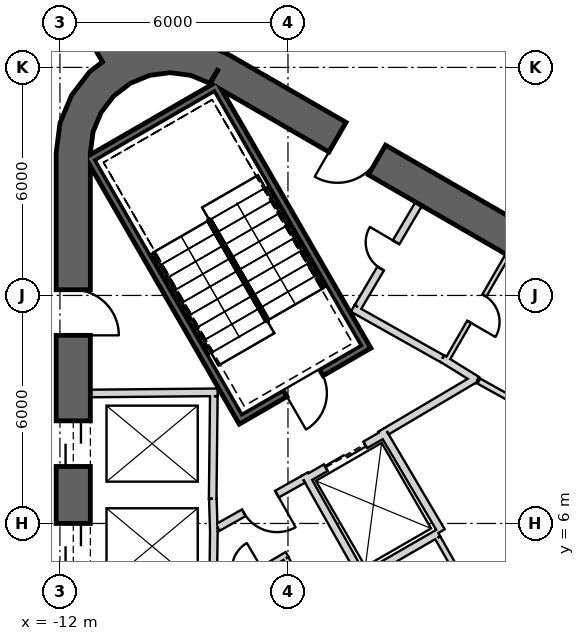
"""IFC4 building model, lengths in metres.
Left out: names, types, materials, properties, quantities, classifications, styles, units other than length and angle.
Written with IfcOpenShell. Run it as: python <this file> out.ifc"""

import sys

from ifc_helpers import new_model, si_unit, direction, frame, frame_2d, origin, place, context, subcontext, project, spatial, polyline, rectangle, outline, extrude, element, fill, save


model = new_model("IFC4")
c1 = context("Model", 3, precision=1e-05, world=origin(), true_north=direction((0.0, 1.0)))
c2 = subcontext(c1, "Body", "Model", "MODEL_VIEW")
j1 = project(units=[si_unit("LENGTHUNIT", "METRE"), si_unit("PLANEANGLEUNIT", "RADIAN")], contexts=[c1])
p1 = place(None, origin())
s1 = spatial("IfcSite", under=j1, at=p1, CompositionType="ELEMENT")
p2 = place(p1, origin())
s2 = spatial("IfcBuilding", under=s1, at=p2, CompositionType="ELEMENT")
p3 = place(p2, frame((0.0, 0.0, 277.2)))
s3 = spatial("IfcBuildingStorey", under=s2, at=p3, CompositionType="ELEMENT", Elevation=277.2)
p4 = place(p3, frame((19.475, 2.208, 0.0), z_axis=(0.0, 0.0, 1.0), x_axis=(-0.866028369851, 0.499994862586, 0.0)))
e1 = element("IfcWall", 1, at=p4, inside=s3, PredefinedType="SHEAR", context=c2, shape_type="SweptSolid", body=[
    extrude(rectangle(XDim=31.523, YDim=0.9, at=frame_2d((15.762, 0.0))), origin(), (0.0, 0.0, 1.0), 6.5),
])
p5 = place(p4, frame((7.062, 0.0, 0.0)))
e2 = element("IfcOpeningElement", 2, at=p5, cuts=e1, PredefinedType="OPENING", context=c2, shape_type="SweptSolid", body=[
    extrude(rectangle(XDim=1.2, YDim=2.4, at=frame_2d((0.6, 1.2))), frame((0.0, 0.46, 0.0), z_axis=(0.0, -1.0, 0.0), x_axis=(1.0, 0.0, 0.0)), (0.0, 0.0, 1.0), 0.92),
])
p6 = place(p4, frame((3.612, 0.0, 0.0)))
e3 = element("IfcOpeningElement", 3, at=p6, cuts=e1, PredefinedType="OPENING", context=c2, shape_type="SweptSolid", body=[
    extrude(rectangle(XDim=1.2, YDim=2.4, at=frame_2d((0.6, 1.2))), frame((0.0, 0.46, 0.0), z_axis=(0.0, -1.0, 0.0), x_axis=(1.0, 0.0, 0.0)), (0.0, 0.0, 1.0), 0.92),
])
p7 = place(p4, frame((26.712, 0.0, 0.0)))
e4 = element("IfcOpeningElement", 4, at=p7, cuts=e1, PredefinedType="OPENING", context=c2, shape_type="SweptSolid", body=[
    extrude(rectangle(XDim=1.2, YDim=2.4, at=frame_2d((0.6, 1.2))), frame((0.0, 0.46, 0.0), z_axis=(0.0, -1.0, 0.0), x_axis=(1.0, 0.0, 0.0)), (0.0, 0.0, 1.0), 0.92),
])
p8 = place(p3, frame((-11.65, 15.762, 0.0), z_axis=(0.0, 0.0, 1.0), x_axis=(0.0, -1.0, 0.0)))
e5 = element("IfcWall", 5, at=p8, inside=s3, PredefinedType="SHEAR", context=c2, shape_type="SweptSolid", body=[
    extrude(rectangle(XDim=31.523, YDim=0.9, at=frame_2d((15.762, 0.0))), origin(), (0.0, 0.0, 1.0), 6.5),
])
p9 = place(p8, frame((7.062, 0.0, 0.0)))
e6 = element("IfcOpeningElement", 6, at=p9, cuts=e5, PredefinedType="OPENING", context=c2, shape_type="SweptSolid", body=[
    extrude(rectangle(XDim=1.2, YDim=2.4, at=frame_2d((0.6, 1.2))), frame((0.0, 0.46, 0.0), z_axis=(0.0, -1.0, 0.0), x_axis=(1.0, 0.0, 0.0)), (0.0, 0.0, 1.0), 0.92),
])
p10 = place(p8, frame((9.762, 0.0, 0.0)))
e7 = element("IfcOpeningElement", 7, at=p10, cuts=e5, PredefinedType="OPENING", context=c2, shape_type="SweptSolid", body=[
    extrude(rectangle(XDim=1.2, YDim=2.4, at=frame_2d((0.6, 1.2))), frame((0.0, 0.46, 0.0), z_axis=(0.0, -1.0, 0.0), x_axis=(1.0, 0.0, 0.0)), (0.0, 0.0, 1.0), 0.92),
])
p11 = place(p8, frame((12.462, 0.0, 0.0)))
e8 = element("IfcOpeningElement", 8, at=p11, cuts=e5, PredefinedType="OPENING", context=c2, shape_type="SweptSolid", body=[
    extrude(rectangle(XDim=1.2, YDim=2.4, at=frame_2d((0.6, 1.2))), frame((0.0, 0.46, 0.0), z_axis=(0.0, -1.0, 0.0), x_axis=(1.0, 0.0, 0.0)), (0.0, 0.0, 1.0), 0.92),
])
p12 = place(p8, frame((15.162, 0.0, 0.0)))
e9 = element("IfcOpeningElement", 9, at=p12, cuts=e5, PredefinedType="OPENING", context=c2, shape_type="SweptSolid", body=[
    extrude(rectangle(XDim=1.2, YDim=2.4, at=frame_2d((0.6, 1.2))), frame((0.0, 0.46, 0.0), z_axis=(0.0, -1.0, 0.0), x_axis=(1.0, 0.0, 0.0)), (0.0, 0.0, 1.0), 0.92),
])
p13 = place(p8, frame((17.862, 0.0, 0.0)))
e10 = element("IfcOpeningElement", 10, at=p13, cuts=e5, PredefinedType="OPENING", context=c2, shape_type="SweptSolid", body=[
    extrude(rectangle(XDim=1.2, YDim=2.4, at=frame_2d((0.6, 1.2))), frame((0.0, 0.46, 0.0), z_axis=(0.0, -1.0, 0.0), x_axis=(1.0, 0.0, 0.0)), (0.0, 0.0, 1.0), 0.92),
])
p14 = place(p8, frame((20.562, 0.0, 0.0)))
e11 = element("IfcOpeningElement", 11, at=p14, cuts=e5, PredefinedType="OPENING", context=c2, shape_type="SweptSolid", body=[
    extrude(rectangle(XDim=1.2, YDim=2.4, at=frame_2d((0.6, 1.2))), frame((0.0, 0.46, 0.0), z_axis=(0.0, -1.0, 0.0), x_axis=(1.0, 0.0, 0.0)), (0.0, 0.0, 1.0), 0.92),
])
p15 = place(p8, frame((23.262, 0.0, 0.0)))
e12 = element("IfcOpeningElement", 12, at=p15, cuts=e5, PredefinedType="OPENING", context=c2, shape_type="SweptSolid", body=[
    extrude(rectangle(XDim=1.2, YDim=2.4, at=frame_2d((0.6, 1.2))), frame((0.0, 0.46, 0.0), z_axis=(0.0, -1.0, 0.0), x_axis=(1.0, 0.0, 0.0)), (0.0, 0.0, 1.0), 0.92),
])
p16 = place(p8, frame((3.612, 0.0, 0.0)))
e13 = element("IfcOpeningElement", 13, at=p16, cuts=e5, PredefinedType="OPENING", context=c2, shape_type="SweptSolid", body=[
    extrude(rectangle(XDim=1.2, YDim=2.4, at=frame_2d((0.6, 1.2))), frame((0.0, 0.46, 0.0), z_axis=(0.0, -1.0, 0.0), x_axis=(1.0, 0.0, 0.0)), (0.0, 0.0, 1.0), 0.92),
])
p17 = place(p8, frame((26.712, 0.0, 0.0)))
e14 = element("IfcOpeningElement", 14, at=p17, cuts=e5, PredefinedType="OPENING", context=c2, shape_type="SweptSolid", body=[
    extrude(rectangle(XDim=1.2, YDim=2.4, at=frame_2d((0.6, 1.2))), frame((0.0, 0.46, 0.0), z_axis=(0.0, -1.0, 0.0), x_axis=(1.0, 0.0, 0.0)), (0.0, 0.0, 1.0), 0.92),
])
p18 = place(p3, origin())
e15 = element("IfcWall", 15, at=p18, inside=s3, PredefinedType="SHEAR", context=c2, shape_type="SweptSolid", body=[
    extrude(outline(polyline([(-7.6, 18.36), (-8.323, 18.659), (-9.1, 18.762), (-9.876, 18.659), (-10.6, 18.36), (-11.221, 17.883), (-11.698, 17.262), (-11.998, 16.538), (-12.1, 15.762), (-11.2, 15.762), (-11.128, 16.305), (-10.919, 16.812), (-10.585, 17.247), (-10.15, 17.58), (-9.644, 17.79), (-9.1, 17.862), (-8.556, 17.79), (-8.05, 17.58), (-7.6, 18.36)])), origin(), (0.0, 0.0, 1.0), 6.5),
])
p19 = place(p3, frame((-10.575, 18.316, 0.0), z_axis=(0.0, 0.0, 1.0), x_axis=(-0.500007350791, 0.866021159762, 0.0)))
e16 = element("IfcWall", 16, at=p19, inside=s3, PredefinedType="SHEAR", context=c2, shape_type="SweptSolid", body=[
    extrude(rectangle(XDim=9.965, YDim=0.7, at=frame_2d((4.982, 0.0))), origin(), (0.0, 0.0, 1.0), 6.5),
])
p20 = place(p19, frame((2.05, 0.0, 0.0)))
e17 = element("IfcOpeningElement", 17, at=p20, cuts=e16, PredefinedType="OPENING", context=c2, shape_type="SweptSolid", body=[
    extrude(rectangle(XDim=1.4, YDim=2.4, at=frame_2d((0.7, 1.2))), frame((0.0, 0.36, 0.0), z_axis=(0.0, -1.0, 0.0), x_axis=(1.0, 0.0, 0.0)), (0.0, 0.0, 1.0), 0.72),
])
p21 = place(p3, frame((-11.2, 9.42, 0.0), z_axis=(0.0, 0.0, 1.0), x_axis=(0.999957167047, 0.009255488683, 0.0)))
e18 = element("IfcWall", 18, at=p21, inside=s3, PredefinedType="PLUMBINGWALL", context=c2, shape_type="SweptSolid", body=[
    extrude(rectangle(XDim=3.35, YDim=0.2, at=frame_2d((1.675, 0.0))), origin(), (0.0, 0.0, 1.0), 6.1),
])
p22 = place(p3, frame((-7.951, 9.35, 0.0), z_axis=(0.0, 0.0, 1.0), x_axis=(-0.011120469654, -0.999938165666, 0.0)))
e19 = element("IfcWall", 19, at=p22, inside=s3, PredefinedType="PLUMBINGWALL", context=c2, shape_type="SweptSolid", body=[
    extrude(rectangle(XDim=2.7, YDim=0.2, at=frame_2d((1.35, 0.0))), origin(), (0.0, 0.0, 1.0), 6.1),
])
p23 = place(p3, frame((-7.977, 6.65, 0.0), z_axis=(0.0, 0.0, 1.0), x_axis=(0.030861509705, -0.999523670164, 0.0)))
e20 = element("IfcWall", 20, at=p23, inside=s3, PredefinedType="PLUMBINGWALL", context=c2, shape_type="SweptSolid", body=[
    extrude(rectangle(XDim=0.878, YDim=0.2, at=frame_2d((0.439, 0.0))), origin(), (0.0, 0.0, 1.0), 6.1),
])
p24 = place(p3, frame((-7.949, 5.895, 0.0), z_axis=(0.0, 0.0, 1.0), x_axis=(-0.012042535896, -0.999927486035, 0.0)))
e21 = element("IfcWall", 21, at=p24, inside=s3, PredefinedType="PLUMBINGWALL", context=c2, shape_type="SweptSolid", body=[
    extrude(rectangle(XDim=1.845, YDim=0.2, at=frame_2d((0.922, 0.0))), origin(), (0.0, 0.0, 1.0), 6.1),
])
p25 = place(p3, frame((-11.245, 15.678, -0.35), z_axis=(0.0, 0.0, 1.0), x_axis=(0.499977274689, -0.866038523851, 0.0)))
e22 = element("IfcWall", 22, at=p25, inside=s3, PredefinedType="SHEAR", context=c2, shape_type="SweptSolid", body=[
    extrude(rectangle(XDim=8.1, YDim=0.2, at=frame_2d((4.05, 0.0))), origin(), (0.0, 0.0, 1.0), 6.45),
])
p26 = place(p3, frame((-7.818, 17.541, -0.35), z_axis=(0.0, 0.0, 1.0), x_axis=(-0.866044365799, -0.499967155389, 0.0)))
e23 = element("IfcWall", 23, at=p26, inside=s3, PredefinedType="SHEAR", context=c2, shape_type="SweptSolid", body=[
    extrude(rectangle(XDim=3.8, YDim=0.2, at=frame_2d((1.9, 0.0))), origin(), (0.0, 0.0, 1.0), 6.45),
])
p27 = place(p3, frame((-7.854, 17.405, -0.35), z_axis=(0.0, 0.0, 1.0), x_axis=(0.499997992926, -0.866026562566, 0.0)))
e24 = element("IfcWall", 24, at=p27, inside=s3, PredefinedType="SHEAR", context=c2, shape_type="SweptSolid", body=[
    extrude(rectangle(XDim=7.9, YDim=0.2, at=frame_2d((3.95, 0.0))), origin(), (0.0, 0.0, 1.0), 6.45),
])
p28 = place(p3, frame((-7.159, 8.8, -0.35), z_axis=(0.0, 0.0, 1.0), x_axis=(0.866047807691, 0.499961193289, 0.0)))
e25 = element("IfcWall", 25, at=p28, inside=s3, PredefinedType="SHEAR", context=c2, shape_type="SweptSolid", body=[
    extrude(rectangle(XDim=3.6, YDim=0.2, at=frame_2d((1.8, 0.0))), origin(), (0.0, 0.0, 1.0), 6.45),
])
p29 = place(p28, frame((1.25, 0.0, 0.35)))
e26 = element("IfcOpeningElement", 26, at=p29, cuts=e25, PredefinedType="OPENING", context=c2, shape_type="SweptSolid", body=[
    extrude(rectangle(XDim=1.1, YDim=2.1, at=frame_2d((0.55, 1.05))), frame((0.0, 0.11, 0.0), z_axis=(0.0, -1.0, 0.0), x_axis=(1.0, 0.0, 0.0)), (0.0, 0.0, 1.0), 0.22),
])
p30 = place(p3, frame((-5.524, 7.168, 0.0), z_axis=(0.0, 0.0, 1.0), x_axis=(0.866024647952, 0.500001309137, 0.0)))
e27 = element("IfcWall", 27, at=p30, inside=s3, PredefinedType="PLUMBINGWALL", context=c2, shape_type="SweptSolid", body=[
    extrude(rectangle(XDim=2.4, YDim=0.2, at=frame_2d((1.2, 0.0))), origin(), (0.0, 0.0, 1.0), 6.1),
])
p31 = place(p30, frame((0.6, 0.0, 0.0)))
e28 = element("IfcOpeningElement", 28, at=p31, cuts=e27, PredefinedType="OPENING", context=c2, shape_type="SweptSolid", body=[
    extrude(rectangle(XDim=1.2, YDim=2.4, at=frame_2d((0.6, 1.2))), frame((0.0, 0.11, 0.0), z_axis=(0.0, -1.0, 0.0), x_axis=(1.0, 0.0, 0.0)), (0.0, 0.0, 1.0), 0.22),
])
p32 = place(p3, frame((-3.538, 8.465, 0.0), z_axis=(0.0, 0.0, 1.0), x_axis=(0.508647062354, -0.860975125052, 0.0)))
e29 = element("IfcWall", 29, at=p32, inside=s3, PredefinedType="PLUMBINGWALL", context=c2, shape_type="SweptSolid", body=[
    extrude(rectangle(XDim=3.1, YDim=0.2, at=frame_2d((1.55, 0.0))), origin(), (0.0, 0.0, 1.0), 6.1),
])
p33 = place(p3, frame((-2.043, 5.748, 0.0), z_axis=(0.0, 0.0, 1.0), x_axis=(-0.866035096217, -0.499983211839, 0.0)))
e30 = element("IfcWall", 30, at=p33, inside=s3, PredefinedType="PLUMBINGWALL", context=c2, shape_type="SweptSolid", body=[
    extrude(rectangle(XDim=2.404, YDim=0.2, at=frame_2d((1.202, 0.0))), origin(), (0.0, 0.0, 1.0), 6.1),
])
p34 = place(p3, frame((-5.562, 7.296, 0.0), z_axis=(0.0, 0.0, 1.0), x_axis=(0.49134651263, -0.870964180966, 0.0)))
e31 = element("IfcWall", 31, at=p34, inside=s3, PredefinedType="PLUMBINGWALL", context=c2, shape_type="SweptSolid", body=[
    extrude(rectangle(XDim=3.0, YDim=0.2, at=frame_2d((1.5, 0.0))), origin(), (0.0, 0.0, 1.0), 6.1),
])
p35 = place(p3, frame((-0.22, 13.06, 0.0), z_axis=(0.0, 0.0, 1.0), x_axis=(-0.499984717929, -0.866034226713, 0.0)))
e32 = element("IfcWall", 32, at=p35, inside=s3, PredefinedType="PARTITIONING", context=c2, shape_type="SweptSolid", body=[
    extrude(rectangle(XDim=3.25, YDim=0.12, at=frame_2d((1.625, 0.0))), origin(), (0.0, 0.0, 1.0), 6.1),
])
p36 = place(p35, frame((1.225, 0.0, 0.0)))
e33 = element("IfcOpeningElement", 33, at=p36, cuts=e32, PredefinedType="OPENING", context=c2, shape_type="SweptSolid", body=[
    extrude(rectangle(XDim=0.8, YDim=2.1, at=frame_2d((0.4, 1.05))), frame((0.0, 0.07, 0.0), z_axis=(0.0, -1.0, 0.0), x_axis=(1.0, 0.0, 0.0)), (0.0, 0.0, 1.0), 0.14),
])
p37 = place(p3, frame((-1.941, 10.339, 0.0), z_axis=(0.0, 0.0, 1.0), x_axis=(0.850216889117, -0.526432561171, 0.0)))
e34 = element("IfcWall", 34, at=p37, inside=s3, PredefinedType="PARTITIONING", context=c2, shape_type="SweptSolid", body=[
    extrude(rectangle(XDim=1.078, YDim=0.2, at=frame_2d((0.539, 0.0))), origin(), (0.0, 0.0, 1.0), 6.1),
])
p38 = place(p3, frame((0.483, 8.936, 0.0), z_axis=(0.0, 0.0, 1.0), x_axis=(-0.874315691004, 0.485357674776, 0.0)))
e35 = element("IfcWall", 35, at=p38, inside=s3, PredefinedType="PLUMBINGWALL", context=c2, shape_type="SweptSolid", body=[
    extrude(rectangle(XDim=1.671, YDim=0.15, at=frame_2d((0.836, 0.0))), origin(), (0.0, 0.0, 1.0), 6.1),
])
p39 = place(p3, frame((-4.296, 11.659, 0.0), z_axis=(0.0, 0.0, 1.0), x_axis=(0.871534483978, -0.490334215854, 0.0)))
e36 = element("IfcWall", 36, at=p39, inside=s3, PredefinedType="PARTITIONING", context=c2, shape_type="SweptSolid", body=[
    extrude(rectangle(XDim=2.7, YDim=0.2, at=frame_2d((1.35, 0.0))), origin(), (0.0, 0.0, 1.0), 6.1),
])
p40 = place(p3, frame((-2.558, 14.409, 0.0), z_axis=(0.0, 0.0, 1.0), x_axis=(-0.508018930956, -0.861345903683, 0.0)))
e37 = element("IfcWall", 37, at=p40, inside=s3, PredefinedType="PARTITIONING", context=c2, shape_type="SweptSolid", body=[
    extrude(rectangle(XDim=3.15, YDim=0.2, at=frame_2d((1.575, 0.0))), origin(), (0.0, 0.0, 1.0), 6.1),
])
p41 = place(p40, frame((1.175, 0.0, 0.0)))
e38 = element("IfcOpeningElement", 38, at=p41, cuts=e37, PredefinedType="OPENING", context=c2, shape_type="SweptSolid", body=[
    extrude(rectangle(XDim=0.8, YDim=2.1, at=frame_2d((0.4, 1.05))), frame((0.0, 0.11, 0.0), z_axis=(0.0, -1.0, 0.0), x_axis=(1.0, 0.0, 0.0)), (0.0, 0.0, 1.0), 0.22),
])
p42 = place(p3, frame((-1.056, 9.818, 0.0), z_axis=(0.0, 0.0, 1.0), x_axis=(-0.860599924646, -0.509281621207, 0.0)))
e39 = element("IfcWall", 39, at=p42, inside=s3, PredefinedType="PARTITIONING", context=c2, shape_type="SweptSolid", body=[
    extrude(rectangle(XDim=2.725, YDim=0.2, at=frame_2d((1.362, 0.0))), origin(), (0.0, 0.0, 1.0), 6.1),
])
p43 = place(p3, frame((-5.6, 7.16, 0.0), z_axis=(0.0, 0.0, 1.0), x_axis=(-0.871363259478, -0.490638431059, 0.0)))
e40 = element("IfcWall", 40, at=p43, inside=s3, PredefinedType="PARTITIONING", context=c2, shape_type="SweptSolid", body=[
    extrude(rectangle(XDim=2.581, YDim=0.2, at=frame_2d((1.291, 0.0))), origin(), (0.0, 0.0, 1.0), 6.1),
])
p44 = place(p43, frame((0.791, 0.0, 0.0)))
e41 = element("IfcOpeningElement", 41, at=p44, cuts=e40, PredefinedType="OPENING", context=c2, shape_type="SweptSolid", body=[
    extrude(rectangle(XDim=1.0, YDim=2.1, at=frame_2d((0.5, 1.05))), frame((0.0, 0.11, 0.0), z_axis=(0.0, -1.0, 0.0), x_axis=(1.0, 0.0, 0.0)), (0.0, 0.0, 1.0), 0.22),
])
p45 = place(p3, frame((-2.059, 5.624, 0.0), z_axis=(0.0, 0.0, 1.0), x_axis=(0.494149180773, -0.869377125959, 0.0)))
e42 = element("IfcWall", 42, at=p45, inside=s3, PredefinedType="PLUMBINGWALL", context=c2, shape_type="SweptSolid", body=[
    extrude(rectangle(XDim=4.231, YDim=0.15, at=frame_2d((2.116, 0.0))), origin(), (0.0, 0.0, 1.0), 6.1),
])
p46 = place(p3, frame((-6.024, 5.183, 0.0), z_axis=(0.0, 0.0, 1.0), x_axis=(-0.860126804455, -0.510080268447, 0.0)))
e43 = element("IfcWall", 43, at=p46, inside=s3, PredefinedType="PLUMBINGWALL", context=c2, shape_type="SweptSolid", body=[
    extrude(rectangle(XDim=2.24, YDim=0.15, at=frame_2d((1.12, 0.0))), origin(), (0.0, 0.0, 1.0), 6.1),
])
p47 = place(p46, frame((0.757, 0.0, 0.0)))
e44 = element("IfcOpeningElement", 44, at=p47, cuts=e43, PredefinedType="OPENING", context=c2, shape_type="SweptSolid", body=[
    extrude(rectangle(XDim=0.8, YDim=2.1, at=frame_2d((0.4, 1.05))), frame((0.0, 0.085, 0.0), z_axis=(0.0, -1.0, 0.0), x_axis=(1.0, 0.0, 0.0)), (0.0, 0.0, 1.0), 0.17),
])
p48 = place(p3, frame((-5.571, 4.19, 0.0), z_axis=(0.0, 0.0, 1.0), x_axis=(-0.476127658675, 0.879376172434, 0.0)))
e45 = element("IfcWall", 45, at=p48, inside=s3, PredefinedType="PLUMBINGWALL", context=c2, shape_type="SweptSolid", body=[
    extrude(rectangle(XDim=1.012, YDim=0.15, at=frame_2d((0.506, 0.0))), origin(), (0.0, 0.0, 1.0), 6.1),
])
p49 = place(p29, origin())
e46 = element("IfcDoor", 46, at=p49, inside=s3, OperationType="SINGLE_SWING_LEFT", PredefinedType="USERDEFINED", context=c2, shape_type="SweptSolid", body=[
    extrude(rectangle(XDim=1.1, YDim=2.1, at=frame_2d((0.55, 1.05))), frame((0.0, 0.025, 0.0), z_axis=(0.0, -1.0, 0.0), x_axis=(1.0, 0.0, 0.0)), (0.0, 0.0, 1.0), 0.05),
])
fill(e26, e46)
p50 = place(p44, origin())
e47 = element("IfcDoor", 47, at=p50, inside=s3, OperationType="SINGLE_SWING_LEFT", PredefinedType="USERDEFINED", context=c2, shape_type="SweptSolid", body=[
    extrude(rectangle(XDim=1.0, YDim=2.1, at=frame_2d((0.5, 1.05))), frame((0.0, 0.025, 0.0), z_axis=(0.0, -1.0, 0.0), x_axis=(1.0, 0.0, 0.0)), (0.0, 0.0, 1.0), 0.05),
])
fill(e41, e47)
p51 = place(p31, origin())
e48 = element("IfcDoor", 48, at=p51, inside=s3, OperationType="SLIDING_TO_LEFT", PredefinedType="USERDEFINED", context=c2, shape_type="SweptSolid", body=[
    extrude(rectangle(XDim=1.2, YDim=2.4, at=frame_2d((0.6, 1.2))), frame((0.0, 0.025, 0.0), z_axis=(0.0, -1.0, 0.0), x_axis=(1.0, 0.0, 0.0)), (0.0, 0.0, 1.0), 0.05),
])
fill(e28, e48)
p52 = place(p41, origin())
e49 = element("IfcDoor", 49, at=p52, inside=s3, OperationType="SINGLE_SWING_LEFT", PredefinedType="USERDEFINED", context=c2, shape_type="SweptSolid", body=[
    extrude(rectangle(XDim=0.8, YDim=2.1, at=frame_2d((0.4, 1.05))), frame((0.0, 0.025, 0.0), z_axis=(0.0, -1.0, 0.0), x_axis=(1.0, 0.0, 0.0)), (0.0, 0.0, 1.0), 0.05),
])
fill(e38, e49)
p53 = place(p36, origin())
e50 = element("IfcDoor", 50, at=p53, inside=s3, OperationType="SINGLE_SWING_RIGHT", PredefinedType="USERDEFINED", context=c2, shape_type="SweptSolid", body=[
    extrude(rectangle(XDim=0.8, YDim=2.1, at=frame_2d((0.4, 1.05))), frame((0.0, 0.025, 0.0), z_axis=(0.0, -1.0, 0.0), x_axis=(1.0, 0.0, 0.0)), (0.0, 0.0, 1.0), 0.05),
])
fill(e33, e50)
p54 = place(p9, origin())
e51 = element("IfcDoor", 51, at=p54, inside=s3, OperationType="SLIDING_TO_LEFT", PredefinedType="USERDEFINED", context=c2, shape_type="SweptSolid", body=[
    extrude(rectangle(XDim=1.2, YDim=2.4, at=frame_2d((0.6, 1.2))), frame((0.0, 0.025, 0.0), z_axis=(0.0, -1.0, 0.0), x_axis=(1.0, 0.0, 0.0)), (0.0, 0.0, 1.0), 0.05),
])
fill(e6, e51)
p55 = place(p10, origin())
e52 = element("IfcDoor", 52, at=p55, inside=s3, OperationType="SLIDING_TO_LEFT", PredefinedType="USERDEFINED", context=c2, shape_type="SweptSolid", body=[
    extrude(rectangle(XDim=1.2, YDim=2.4, at=frame_2d((0.6, 1.2))), frame((0.0, 0.025, 0.0), z_axis=(0.0, -1.0, 0.0), x_axis=(1.0, 0.0, 0.0)), (0.0, 0.0, 1.0), 0.05),
])
fill(e7, e52)
p56 = place(p7, origin())
e53 = element("IfcDoor", 53, at=p56, inside=s3, OperationType="SINGLE_SWING_RIGHT", PredefinedType="USERDEFINED", context=c2, shape_type="SweptSolid", body=[
    extrude(rectangle(XDim=1.2, YDim=2.4, at=frame_2d((0.6, 1.2))), frame((0.0, 0.025, 0.0), z_axis=(0.0, -1.0, 0.0), x_axis=(1.0, 0.0, 0.0)), (0.0, 0.0, 1.0), 0.05),
])
fill(e4, e53)
p57 = place(p16, origin())
e54 = element("IfcDoor", 54, at=p57, inside=s3, OperationType="SINGLE_SWING_RIGHT", PredefinedType="USERDEFINED", context=c2, shape_type="SweptSolid", body=[
    extrude(rectangle(XDim=1.2, YDim=2.4, at=frame_2d((0.6, 1.2))), frame((0.0, 0.025, 0.0), z_axis=(0.0, -1.0, 0.0), x_axis=(1.0, 0.0, 0.0)), (0.0, 0.0, 1.0), 0.05),
])
fill(e13, e54)
save(model, sys.argv[1])
